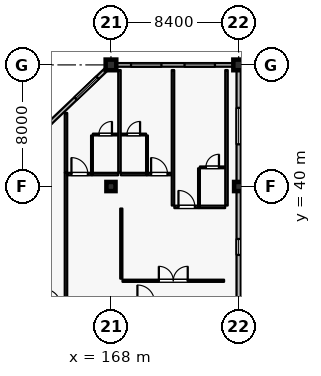
"""IFC4 building model, lengths in metres.
Left out: names, types, materials, properties, quantities, classifications, styles, units other than length and angle.
Written with IfcOpenShell. Run it as: python <this file> out.ifc"""

import sys

from ifc_helpers import new_model, si_unit, direction, frame, frame_2d, origin, origin_2d, place, context, subcontext, project, spatial, rectangle, extrude, element, fill, save


model = new_model("IFC4")
c1 = context("Model", 3, precision=1e-05, world=origin(), true_north=direction((0.0, 1.0)))
c2 = subcontext(c1, "Body", "Model", "MODEL_VIEW")
j1 = project(units=[si_unit("LENGTHUNIT", "METRE"), si_unit("PLANEANGLEUNIT", "RADIAN")], contexts=[c1])
p1 = place(None, origin())
s1 = spatial("IfcSite", under=j1, at=p1, CompositionType="ELEMENT")
p2 = place(p1, origin())
s2 = spatial("IfcBuilding", under=s1, at=p2, CompositionType="ELEMENT")
p3 = place(p2, frame((0.0, 0.0, 32.4)))
s3 = spatial("IfcBuildingStorey", under=s2, at=p3, CompositionType="ELEMENT", Elevation=32.4)
for number, where, z_axis, x_axis in (
    (1, (168.0, 48.0, 0.0), (0.0, 0.0, 1.0), (1.0, 0.0, 0.0)),
    (2, (176.4, 48.0, 0.0), (0.0, 0.0, 1.0), (1.0, 0.0, 0.0)),
):
    element("IfcColumn", number, at=place(p3, frame(where, z_axis=z_axis, x_axis=x_axis)), inside=s3, PredefinedType="COLUMN", context=c2, shape_type="SweptSolid", body=[
        extrude(rectangle(XDim=0.7, YDim=0.7, at=origin_2d()), origin(), (0.0, 0.0, 1.0), 3.6),
    ])
for number, where, z_axis, x_axis in (
    (3, (168.0, 40.0, 0.0), (0.0, 0.0, 1.0), (1.0, 0.0, 0.0)),
    (4, (176.4, 40.0, 0.0), (0.0, 0.0, 1.0), (1.0, 0.0, 0.0)),
):
    element("IfcColumn", number, at=place(p3, frame(where, z_axis=z_axis, x_axis=x_axis)), inside=s3, PredefinedType="COLUMN", context=c2, shape_type="SweptSolid", body=[
        extrude(rectangle(XDim=0.6, YDim=0.6, at=origin_2d()), origin(), (0.0, 0.0, 1.0), 3.6),
    ])
p4 = place(p3, frame((159.95, 40.333, 0.0), z_axis=(0.0, 0.0, 1.0), x_axis=(0.724105170588, 0.689689569247, 0.0)))
e5 = element("IfcWall", 5, at=p4, inside=s3, PredefinedType="SOLIDWALL", context=c2, shape_type="SweptSolid", body=[
    extrude(rectangle(XDim=10.634, YDim=0.24, at=frame_2d((5.317, 0.0))), origin(), (0.0, 0.0, 1.0), 2.89),
])
p5 = place(p4, frame((0.215, 0.0, 0.8)))
e6 = element("IfcOpeningElement", 6, at=p5, cuts=e5, PredefinedType="OPENING", context=c2, shape_type="SweptSolid", body=[
    extrude(rectangle(XDim=1.6, YDim=1.6, at=frame_2d((0.8, 0.8))), frame((0.0, 0.13, 0.0), z_axis=(0.0, -1.0, 0.0), x_axis=(1.0, 0.0, 0.0)), (0.0, 0.0, 1.0), 0.26),
])
p6 = place(p4, frame((3.599, 0.0, 0.8)))
e7 = element("IfcOpeningElement", 7, at=p6, cuts=e5, PredefinedType="OPENING", context=c2, shape_type="SweptSolid", body=[
    extrude(rectangle(XDim=2.0, YDim=1.75, at=frame_2d((1.0, 0.875))), frame((0.0, 0.13, 0.0), z_axis=(0.0, -1.0, 0.0), x_axis=(1.0, 0.0, 0.0)), (0.0, 0.0, 1.0), 0.26),
])
p7 = place(p4, frame((7.901, 0.0, 0.8)))
e8 = element("IfcOpeningElement", 8, at=p7, cuts=e5, PredefinedType="OPENING", context=c2, shape_type="SweptSolid", body=[
    extrude(rectangle(XDim=2.0, YDim=1.75, at=frame_2d((1.0, 0.875))), frame((0.0, 0.13, 0.0), z_axis=(0.0, -1.0, 0.0), x_axis=(1.0, 0.0, 0.0)), (0.0, 0.0, 1.0), 0.26),
])
p8 = place(p3, frame((168.35, 48.0, 0.0), z_axis=(0.0, 0.0, 1.0), x_axis=(1.0, 0.0, 0.0)))
e9 = element("IfcWall", 9, at=p8, inside=s3, PredefinedType="SOLIDWALL", context=c2, shape_type="SweptSolid", body=[
    extrude(rectangle(XDim=7.7, YDim=0.24, at=frame_2d((3.85, 0.0))), origin(), (0.0, 0.0, 1.0), 2.89),
])
p9 = place(p8, frame((0.97, 0.0, 0.8)))
e10 = element("IfcOpeningElement", 10, at=p9, cuts=e9, PredefinedType="OPENING", context=c2, shape_type="SweptSolid", body=[
    extrude(rectangle(XDim=2.0, YDim=1.75, at=frame_2d((1.0, 0.875))), frame((0.0, 0.13, 0.0), z_axis=(0.0, -1.0, 0.0), x_axis=(1.0, 0.0, 0.0)), (0.0, 0.0, 1.0), 0.26),
])
p10 = place(p8, frame((4.49, 0.0, 0.8)))
e11 = element("IfcOpeningElement", 11, at=p10, cuts=e9, PredefinedType="OPENING", context=c2, shape_type="SweptSolid", body=[
    extrude(rectangle(XDim=2.0, YDim=1.75, at=frame_2d((1.0, 0.875))), frame((0.0, 0.13, 0.0), z_axis=(0.0, -1.0, 0.0), x_axis=(1.0, 0.0, 0.0)), (0.0, 0.0, 1.0), 0.26),
])
p11 = place(p3, frame((176.4, 47.65, 0.0), z_axis=(0.0, 0.0, 1.0), x_axis=(0.0, -1.0, 0.0)))
e12 = element("IfcWall", 12, at=p11, inside=s3, PredefinedType="SOLIDWALL", context=c2, shape_type="SweptSolid", body=[
    extrude(rectangle(XDim=7.35, YDim=0.28, at=frame_2d((3.675, 0.0))), origin(), (0.0, 0.0, 1.0), 2.7),
])
p12 = place(p11, frame((2.475, 0.0, 0.5)))
e13 = element("IfcOpeningElement", 13, at=p12, cuts=e12, PredefinedType="OPENING", context=c2, shape_type="SweptSolid", body=[
    extrude(rectangle(XDim=2.4, YDim=1.65, at=frame_2d((1.2, 0.825))), frame((0.0, 0.15, 0.0), z_axis=(0.0, -1.0, 0.0), x_axis=(1.0, 0.0, 0.0)), (0.0, 0.0, 1.0), 0.3),
])
p13 = place(p3, frame((176.4, 39.7, 0.0), z_axis=(0.0, 0.0, 1.0), x_axis=(0.0, -1.0, 0.0)))
e14 = element("IfcWall", 14, at=p13, inside=s3, PredefinedType="SOLIDWALL", context=c2, shape_type="SweptSolid", body=[
    extrude(rectangle(XDim=7.35, YDim=0.28, at=frame_2d((3.675, 0.0))), origin(), (0.0, 0.0, 1.0), 2.7),
])
p14 = place(p13, frame((3.15, 0.0, 0.5)))
e15 = element("IfcOpeningElement", 15, at=p14, cuts=e14, PredefinedType="OPENING", context=c2, shape_type="SweptSolid", body=[
    extrude(rectangle(XDim=1.05, YDim=1.65, at=frame_2d((0.525, 0.825))), frame((0.0, 0.15, 0.0), z_axis=(0.0, -1.0, 0.0), x_axis=(1.0, 0.0, 0.0)), (0.0, 0.0, 1.0), 0.3),
])
p15 = place(p3, frame((165.04, 32.26, 0.0), z_axis=(0.0, 0.0, 1.0), x_axis=(0.0, 1.0, 0.0)))
e16 = element("IfcWall", 16, at=p15, inside=s3, PredefinedType="PARTITIONING", context=c2, shape_type="SweptSolid", body=[
    extrude(rectangle(XDim=8.64, YDim=0.16, at=frame_2d((4.32, 0.0))), origin(), (0.0, 0.0, 1.0), 3.335),
])
p16 = place(p3, frame((165.13, 40.82, 0.0), z_axis=(0.0, 0.0, 1.0), x_axis=(1.0, 0.0, 0.0)))
e17 = element("IfcWall", 17, at=p16, inside=s3, PredefinedType="PARTITIONING", context=c2, shape_type="SweptSolid", body=[
    extrude(rectangle(XDim=1.62, YDim=0.16, at=frame_2d((0.81, 0.0))), origin(), (0.0, 0.0, 1.0), 3.335),
])
p17 = place(p16, frame((0.27, 0.0, 0.0)))
e18 = element("IfcOpeningElement", 18, at=p17, cuts=e17, PredefinedType="OPENING", context=c2, shape_type="SweptSolid", body=[
    extrude(rectangle(XDim=1.08, YDim=2.3, at=frame_2d((0.54, 1.15))), frame((0.0, 0.09, 0.0), z_axis=(0.0, -1.0, 0.0), x_axis=(1.0, 0.0, 0.0)), (0.0, 0.0, 1.0), 0.18),
])
p18 = place(p3, frame((166.76, 40.82, 0.0), z_axis=(0.0, 0.0, 1.0), x_axis=(1.0, 0.0, 0.0)))
e19 = element("IfcWall", 19, at=p18, inside=s3, PredefinedType="PARTITIONING", context=c2, shape_type="SweptSolid", body=[
    extrude(rectangle(XDim=1.71, YDim=0.16, at=frame_2d((0.855, 0.0))), origin(), (0.0, 0.0, 1.0), 3.335),
])
p19 = place(p3, frame((166.75, 40.91, 0.0), z_axis=(0.0, 0.0, 1.0), x_axis=(0.0, 1.0, 0.0)))
e20 = element("IfcWall", 20, at=p19, inside=s3, PredefinedType="PARTITIONING", context=c2, shape_type="SweptSolid", body=[
    extrude(rectangle(XDim=2.45, YDim=0.115, at=frame_2d((1.225, 0.0))), origin(), (0.0, 0.0, 1.0), 3.335),
])
p20 = place(p3, frame((166.81, 43.42, 0.0), z_axis=(0.0, 0.0, 1.0), x_axis=(1.0, 0.0, 0.0)))
e21 = element("IfcWall", 21, at=p20, inside=s3, PredefinedType="PARTITIONING", context=c2, shape_type="SweptSolid", body=[
    extrude(rectangle(XDim=1.65, YDim=0.115, at=frame_2d((0.825, 0.0))), origin(), (0.0, 0.0, 1.0), 3.335),
])
p21 = place(p20, frame((0.395, 0.0, 0.0)))
e22 = element("IfcOpeningElement", 22, at=p21, cuts=e21, PredefinedType="OPENING", context=c2, shape_type="SweptSolid", body=[
    extrude(rectangle(XDim=0.86, YDim=2.12, at=frame_2d((0.43, 1.06))), frame((0.0, 0.067, 0.0), z_axis=(0.0, -1.0, 0.0), x_axis=(1.0, 0.0, 0.0)), (0.0, 0.0, 1.0), 0.135),
])
p22 = place(p3, frame((165.04, 40.91, 0.0), z_axis=(0.0, 0.0, 1.0), x_axis=(0.0, 1.0, 0.0)))
e23 = element("IfcWall", 23, at=p22, inside=s3, PredefinedType="PARTITIONING", context=c2, shape_type="SweptSolid", body=[
    extrude(rectangle(XDim=3.93, YDim=0.16, at=frame_2d((1.965, 0.0))), origin(), (0.0, 0.0, 1.0), 3.335),
])
p23 = place(p3, frame((168.65, 40.82, 0.0), z_axis=(0.0, 0.0, 1.0), x_axis=(1.0, 0.0, 0.0)))
e24 = element("IfcWall", 24, at=p23, inside=s3, PredefinedType="PARTITIONING", context=c2, shape_type="SweptSolid", body=[
    extrude(rectangle(XDim=1.71, YDim=0.16, at=frame_2d((0.855, 0.0))), origin(), (0.0, 0.0, 1.0), 3.335),
])
p24 = place(p3, frame((170.37, 40.82, 0.0), z_axis=(0.0, 0.0, 1.0), x_axis=(1.0, 0.0, 0.0)))
e25 = element("IfcWall", 25, at=p24, inside=s3, PredefinedType="PARTITIONING", context=c2, shape_type="SweptSolid", body=[
    extrude(rectangle(XDim=1.62, YDim=0.16, at=frame_2d((0.81, 0.0))), origin(), (0.0, 0.0, 1.0), 3.335),
])
p25 = place(p24, frame((0.27, 0.0, 0.0)))
e26 = element("IfcOpeningElement", 26, at=p25, cuts=e25, PredefinedType="OPENING", context=c2, shape_type="SweptSolid", body=[
    extrude(rectangle(XDim=1.08, YDim=2.3, at=frame_2d((0.54, 1.15))), frame((0.0, 0.09, 0.0), z_axis=(0.0, -1.0, 0.0), x_axis=(1.0, 0.0, 0.0)), (0.0, 0.0, 1.0), 0.18),
])
p26 = place(p3, frame((170.37, 40.91, 0.0), z_axis=(0.0, 0.0, 1.0), x_axis=(0.0, 1.0, 0.0)))
e27 = element("IfcWall", 27, at=p26, inside=s3, PredefinedType="PARTITIONING", context=c2, shape_type="SweptSolid", body=[
    extrude(rectangle(XDim=2.45, YDim=0.115, at=frame_2d((1.225, 0.0))), origin(), (0.0, 0.0, 1.0), 3.335),
])
p27 = place(p3, frame((168.66, 43.42, 0.0), z_axis=(0.0, 0.0, 1.0), x_axis=(1.0, 0.0, 0.0)))
e28 = element("IfcWall", 28, at=p27, inside=s3, PredefinedType="PARTITIONING", context=c2, shape_type="SweptSolid", body=[
    extrude(rectangle(XDim=1.65, YDim=0.115, at=frame_2d((0.825, 0.0))), origin(), (0.0, 0.0, 1.0), 3.335),
])
p28 = place(p27, frame((0.395, 0.0, 0.0)))
e29 = element("IfcOpeningElement", 29, at=p28, cuts=e28, PredefinedType="OPENING", context=c2, shape_type="SweptSolid", body=[
    extrude(rectangle(XDim=0.86, YDim=2.12, at=frame_2d((0.43, 1.06))), frame((0.0, 0.067, 0.0), z_axis=(0.0, -1.0, 0.0), x_axis=(1.0, 0.0, 0.0)), (0.0, 0.0, 1.0), 0.135),
])
p29 = place(p3, frame((168.56, 40.91, 0.0), z_axis=(0.0, 0.0, 1.0), x_axis=(0.0, 1.0, 0.0)))
e30 = element("IfcWall", 30, at=p29, inside=s3, PredefinedType="PARTITIONING", context=c2, shape_type="SweptSolid", body=[
    extrude(rectangle(XDim=6.75, YDim=0.16, at=frame_2d((3.375, 0.0))), origin(), (0.0, 0.0, 1.0), 3.335),
])
p30 = place(p3, frame((172.17, 38.66, 0.0), z_axis=(0.0, 0.0, 1.0), x_axis=(1.0, 0.0, 0.0)))
e31 = element("IfcWall", 31, at=p30, inside=s3, PredefinedType="PARTITIONING", context=c2, shape_type="SweptSolid", body=[
    extrude(rectangle(XDim=1.62, YDim=0.16, at=frame_2d((0.81, 0.0))), origin(), (0.0, 0.0, 1.0), 3.335),
])
p31 = place(p30, frame((0.27, 0.0, 0.0)))
e32 = element("IfcOpeningElement", 32, at=p31, cuts=e31, PredefinedType="OPENING", context=c2, shape_type="SweptSolid", body=[
    extrude(rectangle(XDim=1.08, YDim=2.3, at=frame_2d((0.54, 1.15))), frame((0.0, 0.09, 0.0), z_axis=(0.0, -1.0, 0.0), x_axis=(1.0, 0.0, 0.0)), (0.0, 0.0, 1.0), 0.18),
])
p32 = place(p3, frame((173.8, 38.66, 0.0), z_axis=(0.0, 0.0, 1.0), x_axis=(1.0, 0.0, 0.0)))
e33 = element("IfcWall", 33, at=p32, inside=s3, PredefinedType="PARTITIONING", context=c2, shape_type="SweptSolid", body=[
    extrude(rectangle(XDim=1.71, YDim=0.16, at=frame_2d((0.855, 0.0))), origin(), (0.0, 0.0, 1.0), 3.335),
])
p33 = place(p3, frame((173.79, 38.75, 0.0), z_axis=(0.0, 0.0, 1.0), x_axis=(0.0, 1.0, 0.0)))
e34 = element("IfcWall", 34, at=p33, inside=s3, PredefinedType="PARTITIONING", context=c2, shape_type="SweptSolid", body=[
    extrude(rectangle(XDim=2.45, YDim=0.115, at=frame_2d((1.225, 0.0))), origin(), (0.0, 0.0, 1.0), 3.335),
])
p34 = place(p3, frame((173.85, 41.26, 0.0), z_axis=(0.0, 0.0, 1.0), x_axis=(1.0, 0.0, 0.0)))
e35 = element("IfcWall", 35, at=p34, inside=s3, PredefinedType="PARTITIONING", context=c2, shape_type="SweptSolid", body=[
    extrude(rectangle(XDim=1.65, YDim=0.115, at=frame_2d((0.825, 0.0))), origin(), (0.0, 0.0, 1.0), 3.335),
])
p35 = place(p34, frame((0.395, 0.0, 0.0)))
e36 = element("IfcOpeningElement", 36, at=p35, cuts=e35, PredefinedType="OPENING", context=c2, shape_type="SweptSolid", body=[
    extrude(rectangle(XDim=0.86, YDim=2.12, at=frame_2d((0.43, 1.06))), frame((0.0, 0.067, 0.0), z_axis=(0.0, -1.0, 0.0), x_axis=(1.0, 0.0, 0.0)), (0.0, 0.0, 1.0), 0.135),
])
for number, where, z_axis, x_axis in (
    (37, (172.08, 38.75, 0.0), (0.0, 0.0, 1.0), (0.0, 1.0, 0.0)),
    (38, (175.6, 38.75, 0.0), (0.0, 0.0, 1.0), (0.0, 1.0, 0.0)),
):
    element("IfcWall", number, at=place(p3, frame(where, z_axis=z_axis, x_axis=x_axis)), inside=s3, PredefinedType="PARTITIONING", context=c2, shape_type="SweptSolid", body=[
        extrude(rectangle(XDim=8.91, YDim=0.16, at=frame_2d((4.455, 0.0))), origin(), (0.0, 0.0, 1.0), 3.335),
    ])
p36 = place(p3, frame((168.76, 33.8, 0.0), z_axis=(0.0, 0.0, 1.0), x_axis=(1.0, 0.0, 0.0)))
e39 = element("IfcWall", 39, at=p36, inside=s3, PredefinedType="PARTITIONING", context=c2, shape_type="SweptSolid", body=[
    extrude(rectangle(XDim=6.68, YDim=0.14, at=frame_2d((3.34, 0.0))), origin(), (0.0, 0.0, 1.0), 3.335),
])
p37 = place(p36, frame((2.39, 0.0, 0.0)))
e40 = element("IfcOpeningElement", 40, at=p37, cuts=e39, PredefinedType="OPENING", context=c2, shape_type="SweptSolid", body=[
    extrude(rectangle(XDim=1.9, YDim=2.4, at=frame_2d((0.95, 1.2))), frame((0.0, 0.08, 0.0), z_axis=(0.0, -1.0, 0.0), x_axis=(1.0, 0.0, 0.0)), (0.0, 0.0, 1.0), 0.16),
])
p38 = place(p3, frame((168.68, 33.94, 0.0), z_axis=(0.0, 0.0, 1.0), x_axis=(0.0, 1.0, 0.0)))
e41 = element("IfcWall", 41, at=p38, inside=s3, PredefinedType="PARTITIONING", context=c2, shape_type="SweptSolid", body=[
    extrude(rectangle(XDim=4.61, YDim=0.14, at=frame_2d((2.305, 0.0))), origin(), (0.0, 0.0, 1.0), 3.335),
])
p39 = place(p7, origin())
e42 = element("IfcWindow", 42, at=p39, inside=s3, PartitioningType="DOUBLE_PANEL_VERTICAL", PredefinedType="WINDOW", context=c2, shape_type="SweptSolid", body=[
    extrude(rectangle(XDim=2.0, YDim=1.75, at=frame_2d((1.0, 0.875))), frame((0.0, 0.03, 0.0), z_axis=(0.0, -1.0, 0.0), x_axis=(1.0, 0.0, 0.0)), (0.0, 0.0, 1.0), 0.06),
])
fill(e8, e42)
p40 = place(p9, origin())
e43 = element("IfcWindow", 43, at=p40, inside=s3, PartitioningType="DOUBLE_PANEL_VERTICAL", PredefinedType="WINDOW", context=c2, shape_type="SweptSolid", body=[
    extrude(rectangle(XDim=2.0, YDim=1.75, at=frame_2d((1.0, 0.875))), frame((0.0, 0.03, 0.0), z_axis=(0.0, -1.0, 0.0), x_axis=(1.0, 0.0, 0.0)), (0.0, 0.0, 1.0), 0.06),
])
fill(e10, e43)
p41 = place(p10, origin())
e44 = element("IfcWindow", 44, at=p41, inside=s3, PartitioningType="DOUBLE_PANEL_VERTICAL", PredefinedType="WINDOW", context=c2, shape_type="SweptSolid", body=[
    extrude(rectangle(XDim=2.0, YDim=1.75, at=frame_2d((1.0, 0.875))), frame((0.0, 0.03, 0.0), z_axis=(0.0, -1.0, 0.0), x_axis=(1.0, 0.0, 0.0)), (0.0, 0.0, 1.0), 0.06),
])
fill(e11, e44)
p42 = place(p12, origin())
e45 = element("IfcWindow", 45, at=p42, inside=s3, PartitioningType="DOUBLE_PANEL_VERTICAL", PredefinedType="WINDOW", context=c2, shape_type="SweptSolid", body=[
    extrude(rectangle(XDim=2.4, YDim=1.65, at=frame_2d((1.2, 0.825))), frame((0.0, 0.03, 0.0), z_axis=(0.0, -1.0, 0.0), x_axis=(1.0, 0.0, 0.0)), (0.0, 0.0, 1.0), 0.06),
])
fill(e13, e45)
p43 = place(p14, origin())
e46 = element("IfcWindow", 46, at=p43, inside=s3, PartitioningType="SINGLE_PANEL", PredefinedType="WINDOW", context=c2, shape_type="SweptSolid", body=[
    extrude(rectangle(XDim=1.05, YDim=1.65, at=frame_2d((0.525, 0.825))), frame((0.0, 0.03, 0.0), z_axis=(0.0, -1.0, 0.0), x_axis=(1.0, 0.0, 0.0)), (0.0, 0.0, 1.0), 0.06),
])
fill(e15, e46)
p44 = place(p17, origin())
e47 = element("IfcDoor", 47, at=p44, inside=s3, OperationType="SINGLE_SWING_LEFT", PredefinedType="DOOR", context=c2, shape_type="SweptSolid", body=[
    extrude(rectangle(XDim=1.08, YDim=2.3, at=frame_2d((0.54, 1.15))), frame((0.0, 0.025, 0.0), z_axis=(0.0, -1.0, 0.0), x_axis=(1.0, 0.0, 0.0)), (0.0, 0.0, 1.0), 0.05),
])
fill(e18, e47)
p45 = place(p21, origin())
e48 = element("IfcDoor", 48, at=p45, inside=s3, OperationType="SINGLE_SWING_RIGHT", PredefinedType="DOOR", context=c2, shape_type="SweptSolid", body=[
    extrude(rectangle(XDim=0.86, YDim=2.12, at=frame_2d((0.43, 1.06))), frame((0.0, 0.025, 0.0), z_axis=(0.0, -1.0, 0.0), x_axis=(1.0, 0.0, 0.0)), (0.0, 0.0, 1.0), 0.05),
])
fill(e22, e48)
p46 = place(p25, origin())
e49 = element("IfcDoor", 49, at=p46, inside=s3, OperationType="SINGLE_SWING_LEFT", PredefinedType="DOOR", context=c2, shape_type="SweptSolid", body=[
    extrude(rectangle(XDim=1.08, YDim=2.3, at=frame_2d((0.54, 1.15))), frame((0.0, 0.025, 0.0), z_axis=(0.0, -1.0, 0.0), x_axis=(1.0, 0.0, 0.0)), (0.0, 0.0, 1.0), 0.05),
])
fill(e26, e49)
p47 = place(p28, origin())
e50 = element("IfcDoor", 50, at=p47, inside=s3, OperationType="SINGLE_SWING_RIGHT", PredefinedType="DOOR", context=c2, shape_type="SweptSolid", body=[
    extrude(rectangle(XDim=0.86, YDim=2.12, at=frame_2d((0.43, 1.06))), frame((0.0, 0.025, 0.0), z_axis=(0.0, -1.0, 0.0), x_axis=(1.0, 0.0, 0.0)), (0.0, 0.0, 1.0), 0.05),
])
fill(e29, e50)
p48 = place(p31, origin())
e51 = element("IfcDoor", 51, at=p48, inside=s3, OperationType="SINGLE_SWING_LEFT", PredefinedType="DOOR", context=c2, shape_type="SweptSolid", body=[
    extrude(rectangle(XDim=1.08, YDim=2.3, at=frame_2d((0.54, 1.15))), frame((0.0, 0.025, 0.0), z_axis=(0.0, -1.0, 0.0), x_axis=(1.0, 0.0, 0.0)), (0.0, 0.0, 1.0), 0.05),
])
fill(e32, e51)
p49 = place(p35, origin())
e52 = element("IfcDoor", 52, at=p49, inside=s3, OperationType="SINGLE_SWING_RIGHT", PredefinedType="DOOR", context=c2, shape_type="SweptSolid", body=[
    extrude(rectangle(XDim=0.86, YDim=2.12, at=frame_2d((0.43, 1.06))), frame((0.0, 0.025, 0.0), z_axis=(0.0, -1.0, 0.0), x_axis=(1.0, 0.0, 0.0)), (0.0, 0.0, 1.0), 0.05),
])
fill(e36, e52)
p50 = place(p37, origin())
e53 = element("IfcDoor", 53, at=p50, inside=s3, OperationType="DOUBLE_DOOR_SINGLE_SWING", PredefinedType="DOOR", context=c2, shape_type="SweptSolid", body=[
    extrude(rectangle(XDim=1.9, YDim=2.4, at=frame_2d((0.95, 1.2))), frame((0.0, 0.025, 0.0), z_axis=(0.0, -1.0, 0.0), x_axis=(1.0, 0.0, 0.0)), (0.0, 0.0, 1.0), 0.05),
])
fill(e40, e53)
save(model, sys.argv[1])
